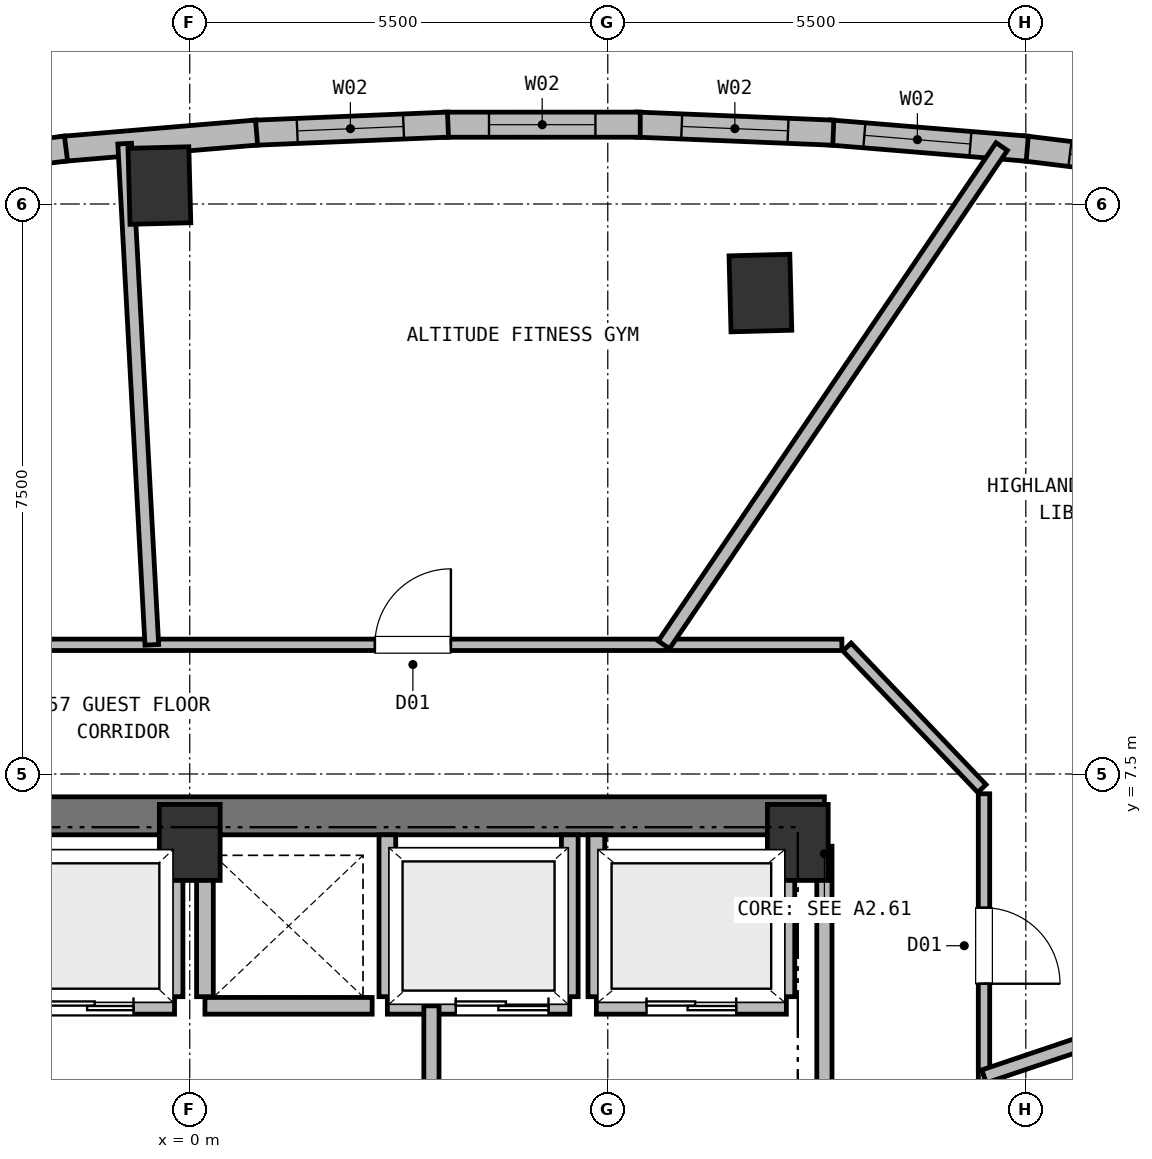
"""IFC4 building model, lengths in metres.
Left out: names, types, materials, properties, quantities, classifications, styles, units other than length and angle.
Written with IfcOpenShell. Run it as: python <this file> out.ifc"""

import sys

from ifc_helpers import new_model, si_unit, direction, frame, frame_2d, origin, origin_2d, place, context, subcontext, project, spatial, rectangle, extrude, element, fill, save


model = new_model("IFC4")
c1 = context("Model", 3, precision=1e-05, world=origin(), true_north=direction((0.0, 1.0)))
c2 = subcontext(c1, "Body", "Model", "MODEL_VIEW")
j1 = project(units=[si_unit("LENGTHUNIT", "METRE"), si_unit("PLANEANGLEUNIT", "RADIAN")], contexts=[c1])
p1 = place(None, origin())
s1 = spatial("IfcSite", under=j1, at=p1, CompositionType="ELEMENT")
p2 = place(p1, origin())
s2 = spatial("IfcBuilding", under=s1, at=p2, CompositionType="ELEMENT")
p3 = place(p2, frame((0.0, 0.0, 228.35)))
s3 = spatial("IfcBuildingStorey", under=s2, at=p3, CompositionType="ELEMENT", Elevation=228.35)
for number, where, z_axis, x_axis in (
    (1, (8.0, 6.6, 0.0), (0.0, 0.0, 1.0), (1.0, 0.0, 0.0)),
    (2, (0.0, 6.6, 0.0), (0.0, 0.0, 1.0), (1.0, 0.0, 0.0)),
):
    element("IfcColumn", number, at=place(p3, frame(where, z_axis=z_axis, x_axis=x_axis)), inside=s3, PredefinedType="COLUMN", context=c2, shape_type="SweptSolid", body=[
        extrude(rectangle(XDim=0.8, YDim=1.0, at=origin_2d()), origin(), (0.0, 0.0, 1.0), 3.8),
    ])
p4 = place(p3, frame((-8.35, 6.95, 0.0), z_axis=(0.0, 0.0, 1.0), x_axis=(1.0, 0.0, 0.0)))
e3 = element("IfcWall", 3, at=p4, inside=s3, PredefinedType="SHEAR", context=c2, shape_type="SweptSolid", body=[
    extrude(rectangle(XDim=16.7, YDim=0.5, at=frame_2d((8.35, 0.0))), origin(), (0.0, 0.0, 1.0), 3.55),
])
for number, where, z_axis, x_axis in (
    (4, (7.508, 13.828, 0.0), (0.0, 0.0, 1.0), (1.0, 0.026, 0.0)),
    (5, (-0.399, 15.243, 0.0), (0.0, 0.0, 1.0), (1.0, 0.026, 0.0)),
):
    element("IfcColumn", number, at=place(p3, frame(where, z_axis=z_axis, x_axis=x_axis)), inside=s3, PredefinedType="COLUMN", context=c2, shape_type="SweptSolid", body=[
        extrude(rectangle(XDim=0.8, YDim=1.0, at=origin_2d()), origin(), (0.0, 0.0, 1.0), 3.8),
    ])
p5 = place(p3, frame((10.969, 15.733, 0.0), z_axis=(0.0, 0.0, 1.0), x_axis=(0.99256490285, -0.121716529819, 0.0)))
e6 = element("IfcWall", 6, at=p5, inside=s3, PredefinedType="SOLIDWALL", context=c2, shape_type="SweptSolid", body=[
    extrude(rectangle(XDim=2.632, YDim=0.33, at=frame_2d((1.316, 0.0))), origin(), (0.0, 0.0, 1.0), 3.55),
])
p6 = place(p5, frame((0.616, 0.0, 0.72)))
e7 = element("IfcOpeningElement", 7, at=p6, cuts=e6, PredefinedType="OPENING", context=c2, shape_type="SweptSolid", body=[
    extrude(rectangle(XDim=1.4, YDim=1.84, at=frame_2d((0.7, 0.92))), frame((0.0, 0.175, 0.0), z_axis=(0.0, -1.0, 0.0), x_axis=(1.0, 0.0, 0.0)), (0.0, 0.0, 1.0), 0.35),
])
p7 = place(p3, frame((8.417, 15.941, 0.0), z_axis=(0.0, 0.0, 1.0), x_axis=(0.996652650266, -0.081752643485, 0.0)))
e8 = element("IfcWall", 8, at=p7, inside=s3, PredefinedType="SOLIDWALL", context=c2, shape_type="SweptSolid", body=[
    extrude(rectangle(XDim=2.61, YDim=0.33, at=frame_2d((1.305, 0.0))), origin(), (0.0, 0.0, 1.0), 3.55),
])
p8 = place(p7, frame((0.46, 0.0, 0.72)))
e9 = element("IfcOpeningElement", 9, at=p8, cuts=e8, PredefinedType="OPENING", context=c2, shape_type="SweptSolid", body=[
    extrude(rectangle(XDim=1.4, YDim=1.84, at=frame_2d((0.7, 0.92))), frame((0.0, 0.175, 0.0), z_axis=(0.0, -1.0, 0.0), x_axis=(1.0, 0.0, 0.0)), (0.0, 0.0, 1.0), 0.35),
])
p9 = place(p3, frame((5.877, 16.045, 0.0), z_axis=(0.0, 0.0, 1.0), x_axis=(0.999156737848, -0.041058655768, 0.0)))
e10 = element("IfcWall", 10, at=p9, inside=s3, PredefinedType="SOLIDWALL", context=c2, shape_type="SweptSolid", body=[
    extrude(rectangle(XDim=2.593, YDim=0.33, at=frame_2d((1.296, 0.0))), origin(), (0.0, 0.0, 1.0), 3.55),
])
p10 = place(p9, frame((0.596, 0.0, 0.72)))
e11 = element("IfcOpeningElement", 11, at=p10, cuts=e10, PredefinedType="OPENING", context=c2, shape_type="SweptSolid", body=[
    extrude(rectangle(XDim=1.4, YDim=1.84, at=frame_2d((0.7, 0.92))), frame((0.0, 0.175, 0.0), z_axis=(0.0, -1.0, 0.0), x_axis=(1.0, 0.0, 0.0)), (0.0, 0.0, 1.0), 0.35),
])
p11 = place(p3, frame((3.348, 16.043, 0.0), z_axis=(0.0, 0.0, 1.0), x_axis=(0.999999982082, 0.000189304303, 0.0)))
e12 = element("IfcWall", 12, at=p11, inside=s3, PredefinedType="SOLIDWALL", context=c2, shape_type="SweptSolid", body=[
    extrude(rectangle(XDim=2.579, YDim=0.33, at=frame_2d((1.29, 0.0))), origin(), (0.0, 0.0, 1.0), 3.55),
])
p12 = place(p11, frame((0.59, 0.0, 0.72)))
e13 = element("IfcOpeningElement", 13, at=p12, cuts=e12, PredefinedType="OPENING", context=c2, shape_type="SweptSolid", body=[
    extrude(rectangle(XDim=1.4, YDim=1.84, at=frame_2d((0.7, 0.92))), frame((0.0, 0.175, 0.0), z_axis=(0.0, -1.0, 0.0), x_axis=(1.0, 0.0, 0.0)), (0.0, 0.0, 1.0), 0.35),
])
p13 = place(p3, frame((0.829, 15.937, 0.0), z_axis=(0.0, 0.0, 1.0), x_axis=(0.999126476611, 0.041788559858, 0.0)))
e14 = element("IfcWall", 14, at=p13, inside=s3, PredefinedType="SOLIDWALL", context=c2, shape_type="SweptSolid", body=[
    extrude(rectangle(XDim=2.571, YDim=0.33, at=frame_2d((1.285, 0.0))), origin(), (0.0, 0.0, 1.0), 3.55),
])
p14 = place(p13, frame((0.585, 0.0, 0.72)))
e15 = element("IfcOpeningElement", 15, at=p14, cuts=e14, PredefinedType="OPENING", context=c2, shape_type="SweptSolid", body=[
    extrude(rectangle(XDim=1.4, YDim=1.84, at=frame_2d((0.7, 0.92))), frame((0.0, 0.175, 0.0), z_axis=(0.0, -1.0, 0.0), x_axis=(1.0, 0.0, 0.0)), (0.0, 0.0, 1.0), 0.35),
])
p15 = place(p3, frame((-1.678, 15.725, 0.0), z_axis=(0.0, 0.0, 1.0), x_axis=(0.996489100747, 0.083722590095, 0.0)))
e16 = element("IfcWall", 16, at=p15, inside=s3, PredefinedType="SOLIDWALL", context=c2, shape_type="SweptSolid", body=[
    extrude(rectangle(XDim=2.566, YDim=0.33, at=frame_2d((1.283, 0.0))), origin(), (0.0, 0.0, 1.0), 3.55),
])
p16 = place(p3, frame((-4.174, 15.409, 0.0), z_axis=(0.0, 0.0, 1.0), x_axis=(0.992107160936, 0.125392907376, 0.0)))
e17 = element("IfcWall", 17, at=p16, inside=s3, PredefinedType="SOLIDWALL", context=c2, shape_type="SweptSolid", body=[
    extrude(rectangle(XDim=2.566, YDim=0.33, at=frame_2d((1.283, 0.0))), origin(), (0.0, 0.0, 1.0), 3.55),
])
p17 = place(p16, frame((0.583, 0.0, 0.72)))
e18 = element("IfcOpeningElement", 18, at=p17, cuts=e17, PredefinedType="OPENING", context=c2, shape_type="SweptSolid", body=[
    extrude(rectangle(XDim=1.4, YDim=1.84, at=frame_2d((0.7, 0.92))), frame((0.0, 0.175, 0.0), z_axis=(0.0, -1.0, 0.0), x_axis=(1.0, 0.0, 0.0)), (0.0, 0.0, 1.0), 0.35),
])
p18 = place(p3, frame((5.35, 4.45, 0.0), z_axis=(0.0, 0.0, 1.0), x_axis=(1.0, 0.0, 0.0)))
e19 = element("IfcWall", 19, at=p18, inside=s3, PredefinedType="PARTITIONING", context=c2, shape_type="SweptSolid", body=[
    extrude(rectangle(XDim=2.5, YDim=0.22, at=frame_2d((1.25, 0.0))), origin(), (0.0, 0.0, 1.0), 3.55),
])
p19 = place(p18, frame((0.66, 0.0, 0.0)))
e20 = element("IfcOpeningElement", 20, at=p19, cuts=e19, PredefinedType="OPENING", context=c2, shape_type="SweptSolid", body=[
    extrude(rectangle(XDim=1.18, YDim=2.15, at=frame_2d((0.59, 1.075))), frame((0.0, 0.12, 0.0), z_axis=(0.0, -1.0, 0.0), x_axis=(1.0, 0.0, 0.0)), (0.0, 0.0, 1.0), 0.24),
])
p20 = place(p3, frame((5.35, 4.57, 0.0), z_axis=(0.0, 0.0, 1.0), x_axis=(0.0, 1.0, 0.0)))
e21 = element("IfcWall", 21, at=p20, inside=s3, PredefinedType="PARTITIONING", context=c2, shape_type="SweptSolid", body=[
    extrude(rectangle(XDim=2.13, YDim=0.22, at=frame_2d((1.065, 0.0))), origin(), (0.0, 0.0, 1.0), 3.55),
])
p21 = place(p3, frame((7.85, 4.57, 0.0), z_axis=(0.0, 0.0, 1.0), x_axis=(0.0, 1.0, 0.0)))
e22 = element("IfcWall", 22, at=p21, inside=s3, PredefinedType="PARTITIONING", context=c2, shape_type="SweptSolid", body=[
    extrude(rectangle(XDim=2.13, YDim=0.22, at=frame_2d((1.065, 0.0))), origin(), (0.0, 0.0, 1.0), 3.18),
])
p22 = place(p3, frame((2.6, 4.45, 0.0), z_axis=(0.0, 0.0, 1.0), x_axis=(1.0, 0.0, 0.0)))
e23 = element("IfcWall", 23, at=p22, inside=s3, PredefinedType="PARTITIONING", context=c2, shape_type="SweptSolid", body=[
    extrude(rectangle(XDim=2.4, YDim=0.22, at=frame_2d((1.2, 0.0))), origin(), (0.0, 0.0, 1.0), 3.55),
])
p23 = place(p22, frame((0.9, 0.0, 0.0)))
e24 = element("IfcOpeningElement", 24, at=p23, cuts=e23, PredefinedType="OPENING", context=c2, shape_type="SweptSolid", body=[
    extrude(rectangle(XDim=1.22, YDim=2.15, at=frame_2d((0.61, 1.075))), frame((0.0, 0.12, 0.0), z_axis=(0.0, -1.0, 0.0), x_axis=(1.0, 0.0, 0.0)), (0.0, 0.0, 1.0), 0.24),
])
for number, where, z_axis, x_axis in (
    (25, (2.6, 4.57, 0.0), (0.0, 0.0, 1.0), (0.0, 1.0, 0.0)),
    (26, (5.0, 4.57, 0.0), (0.0, 0.0, 1.0), (0.0, 1.0, 0.0)),
):
    element("IfcWall", number, at=place(p3, frame(where, z_axis=z_axis, x_axis=x_axis)), inside=s3, PredefinedType="PARTITIONING", context=c2, shape_type="SweptSolid", body=[
        extrude(rectangle(XDim=2.13, YDim=0.22, at=frame_2d((1.065, 0.0))), origin(), (0.0, 0.0, 1.0), 3.55),
    ])
p24 = place(p3, frame((-2.4, 4.45, 0.0), z_axis=(0.0, 0.0, 1.0), x_axis=(1.0, 0.0, 0.0)))
e27 = element("IfcWall", 27, at=p24, inside=s3, PredefinedType="PARTITIONING", context=c2, shape_type="SweptSolid", body=[
    extrude(rectangle(XDim=2.2, YDim=0.22, at=frame_2d((1.1, 0.0))), origin(), (0.0, 0.0, 1.0), 3.55),
])
p25 = place(p24, frame((0.54, 0.0, 0.0)))
e28 = element("IfcOpeningElement", 28, at=p25, cuts=e27, PredefinedType="OPENING", context=c2, shape_type="SweptSolid", body=[
    extrude(rectangle(XDim=1.12, YDim=2.15, at=frame_2d((0.56, 1.075))), frame((0.0, 0.12, 0.0), z_axis=(0.0, -1.0, 0.0), x_axis=(1.0, 0.0, 0.0)), (0.0, 0.0, 1.0), 0.24),
])
p26 = place(p3, frame((-0.2, 4.57, 0.0), z_axis=(0.0, 0.0, 1.0), x_axis=(0.0, 1.0, 0.0)))
e29 = element("IfcWall", 29, at=p26, inside=s3, PredefinedType="PARTITIONING", context=c2, shape_type="SweptSolid", body=[
    extrude(rectangle(XDim=2.13, YDim=0.22, at=frame_2d((1.065, 0.0))), origin(), (0.0, 0.0, 1.0), 3.55),
])
p27 = place(p3, frame((0.2, 4.45, 0.0), z_axis=(0.0, 0.0, 1.0), x_axis=(1.0, 0.0, 0.0)))
e30 = element("IfcWall", 30, at=p27, inside=s3, PredefinedType="PARTITIONING", context=c2, shape_type="SweptSolid", body=[
    extrude(rectangle(XDim=2.2, YDim=0.22, at=frame_2d((1.1, 0.0))), origin(), (0.0, 0.0, 1.0), 3.55),
])
p28 = place(p3, frame((0.2, 4.57, 0.0), z_axis=(0.0, 0.0, 1.0), x_axis=(0.0, 1.0, 0.0)))
e31 = element("IfcWall", 31, at=p28, inside=s3, PredefinedType="PARTITIONING", context=c2, shape_type="SweptSolid", body=[
    extrude(rectangle(XDim=2.13, YDim=0.22, at=frame_2d((1.065, 0.0))), origin(), (0.0, 0.0, 1.0), 3.55),
])
p29 = place(p3, frame((3.18, 1.15, 0.0), z_axis=(0.0, 0.0, 1.0), x_axis=(0.0, 1.0, 0.0)))
e32 = element("IfcWall", 32, at=p29, inside=s3, PredefinedType="PARTITIONING", context=c2, shape_type="SweptSolid", body=[
    extrude(rectangle(XDim=3.3, YDim=0.2, at=frame_2d((1.65, 0.0))), origin(), (0.0, 0.0, 1.0), 3.55),
])
p30 = place(p29, frame((1.08, 0.0, 0.0)))
e33 = element("IfcOpeningElement", 33, at=p30, cuts=e32, PredefinedType="OPENING", context=c2, shape_type="SweptSolid", body=[
    extrude(rectangle(XDim=1.15, YDim=2.15, at=frame_2d((0.575, 1.075))), frame((0.0, 0.11, 0.0), z_axis=(0.0, -1.0, 0.0), x_axis=(1.0, 0.0, 0.0)), (0.0, 0.0, 1.0), 0.22),
])
p31 = place(p3, frame((8.35, 1.25, 0.0), z_axis=(0.0, 0.0, 1.0), x_axis=(0.0, 1.0, 0.0)))
e34 = element("IfcWall", 34, at=p31, inside=s3, PredefinedType="PARTITIONING", context=c2, shape_type="SweptSolid", body=[
    extrude(rectangle(XDim=5.3, YDim=0.2, at=frame_2d((2.65, 0.0))), origin(), (0.0, 0.0, 1.0), 3.55),
])
p32 = place(p31, frame((0.95, 0.0, 0.0)))
e35 = element("IfcOpeningElement", 35, at=p32, cuts=e34, PredefinedType="OPENING", context=c2, shape_type="SweptSolid", body=[
    extrude(rectangle(XDim=1.15, YDim=2.15, at=frame_2d((0.575, 1.075))), frame((0.0, 0.11, 0.0), z_axis=(0.0, -1.0, 0.0), x_axis=(1.0, 0.0, 0.0)), (0.0, 0.0, 1.0), 0.22),
])
p33 = place(p3, frame((10.45, 7.24, 0.0), z_axis=(0.0, 0.0, 1.0), x_axis=(0.0, -1.0, 0.0)))
e36 = element("IfcWall", 36, at=p33, inside=s3, PredefinedType="PARTITIONING", context=c2, shape_type="SweptSolid", body=[
    extrude(rectangle(XDim=14.48, YDim=0.15, at=frame_2d((7.24, 0.0))), origin(), (0.0, 0.0, 1.0), 3.55),
])
p34 = place(p33, frame((5.499, 0.0, 0.0)))
e37 = element("IfcOpeningElement", 37, at=p34, cuts=e36, PredefinedType="OPENING", context=c2, shape_type="SweptSolid", body=[
    extrude(rectangle(XDim=1.06, YDim=2.15, at=frame_2d((0.53, 1.075))), frame((0.0, 0.085, 0.0), z_axis=(0.0, -1.0, 0.0), x_axis=(1.0, 0.0, 0.0)), (0.0, 0.0, 1.0), 0.17),
])
p35 = place(p33, frame((1.5, 0.0, 0.0)))
e38 = element("IfcOpeningElement", 38, at=p35, cuts=e36, PredefinedType="OPENING", context=c2, shape_type="SweptSolid", body=[
    extrude(rectangle(XDim=1.0, YDim=2.15, at=frame_2d((0.5, 1.075))), frame((0.0, 0.085, 0.0), z_axis=(0.0, -1.0, 0.0), x_axis=(1.0, 0.0, 0.0)), (0.0, 0.0, 1.0), 0.17),
])
p36 = place(p3, frame((8.648, 9.171, 0.0), z_axis=(0.0, 0.0, 1.0), x_axis=(0.689960858356, -0.723846678473, 0.0)))
e39 = element("IfcWall", 39, at=p36, inside=s3, PredefinedType="PARTITIONING", context=c2, shape_type="SweptSolid", body=[
    extrude(rectangle(XDim=2.572, YDim=0.15, at=frame_2d((1.286, 0.0))), origin(), (0.0, 0.0, 1.0), 3.55),
])
p37 = place(p3, frame((-8.58, 9.2, 0.0), z_axis=(0.0, 0.0, 1.0), x_axis=(1.0, 0.0, 0.0)))
e40 = element("IfcWall", 40, at=p37, inside=s3, PredefinedType="PARTITIONING", context=c2, shape_type="SweptSolid", body=[
    extrude(rectangle(XDim=17.16, YDim=0.15, at=frame_2d((8.58, 0.0))), origin(), (0.0, 0.0, 1.0), 3.55),
])
p38 = place(p37, frame((4.89, 0.0, 0.0)))
e41 = element("IfcOpeningElement", 41, at=p38, cuts=e40, PredefinedType="OPENING", context=c2, shape_type="SweptSolid", body=[
    extrude(rectangle(XDim=1.0, YDim=2.15, at=frame_2d((0.5, 1.075))), frame((0.0, 0.085, 0.0), z_axis=(0.0, -1.0, 0.0), x_axis=(1.0, 0.0, 0.0)), (0.0, 0.0, 1.0), 0.17),
])
p39 = place(p37, frame((11.016, 0.0, 0.0)))
e42 = element("IfcOpeningElement", 42, at=p39, cuts=e40, PredefinedType="OPENING", context=c2, shape_type="SweptSolid", body=[
    extrude(rectangle(XDim=1.0, YDim=2.15, at=frame_2d((0.5, 1.075))), frame((0.0, 0.085, 0.0), z_axis=(0.0, -1.0, 0.0), x_axis=(1.0, 0.0, 0.0)), (0.0, 0.0, 1.0), 0.17),
])
p40 = place(p3, frame((10.45, 3.521, 0.0), z_axis=(0.0, 0.0, 1.0), x_axis=(0.947649729023, 0.319311745919, 0.0)))
e43 = element("IfcWall", 43, at=p40, inside=s3, PredefinedType="PARTITIONING", context=c2, shape_type="SweptSolid", body=[
    extrude(rectangle(XDim=8.474, YDim=0.18, at=frame_2d((4.237, 0.0))), origin(), (0.0, 0.0, 1.0), 3.55),
])
p41 = place(p3, frame((6.238, 9.2, 0.0), z_axis=(0.0, 0.0, 1.0), x_axis=(0.561184790161, 0.827690540777, 0.0)))
e44 = element("IfcWall", 44, at=p41, inside=s3, PredefinedType="PARTITIONING", context=c2, shape_type="SweptSolid", body=[
    extrude(rectangle(XDim=7.92, YDim=0.18, at=frame_2d((3.96, 0.0))), origin(), (0.0, 0.0, 1.0), 3.55),
])
p42 = place(p3, frame((-0.499, 9.2, 0.0), z_axis=(0.0, 0.0, 1.0), x_axis=(-0.054120704993, 0.998534400655, 0.0)))
e45 = element("IfcWall", 45, at=p42, inside=s3, PredefinedType="PARTITIONING", context=c2, shape_type="SweptSolid", body=[
    extrude(rectangle(XDim=6.604, YDim=0.18, at=frame_2d((3.302, 0.0))), origin(), (0.0, 0.0, 1.0), 3.55),
])
p43 = place(p6, origin())
e46 = element("IfcWindow", 46, at=p43, inside=s3, PartitioningType="SINGLE_PANEL", PredefinedType="WINDOW", context=c2, shape_type="SweptSolid", body=[
    extrude(rectangle(XDim=1.4, YDim=1.84, at=frame_2d((0.7, 0.92))), frame((0.0, 0.03, 0.0), z_axis=(0.0, -1.0, 0.0), x_axis=(1.0, 0.0, 0.0)), (0.0, 0.0, 1.0), 0.06),
])
fill(e7, e46)
p44 = place(p8, origin())
e47 = element("IfcWindow", 47, at=p44, inside=s3, PartitioningType="SINGLE_PANEL", PredefinedType="WINDOW", context=c2, shape_type="SweptSolid", body=[
    extrude(rectangle(XDim=1.4, YDim=1.84, at=frame_2d((0.7, 0.92))), frame((0.0, 0.03, 0.0), z_axis=(0.0, -1.0, 0.0), x_axis=(1.0, 0.0, 0.0)), (0.0, 0.0, 1.0), 0.06),
])
fill(e9, e47)
p45 = place(p10, origin())
e48 = element("IfcWindow", 48, at=p45, inside=s3, PartitioningType="SINGLE_PANEL", PredefinedType="WINDOW", context=c2, shape_type="SweptSolid", body=[
    extrude(rectangle(XDim=1.4, YDim=1.84, at=frame_2d((0.7, 0.92))), frame((0.0, 0.03, 0.0), z_axis=(0.0, -1.0, 0.0), x_axis=(1.0, 0.0, 0.0)), (0.0, 0.0, 1.0), 0.06),
])
fill(e11, e48)
p46 = place(p12, origin())
e49 = element("IfcWindow", 49, at=p46, inside=s3, PartitioningType="SINGLE_PANEL", PredefinedType="WINDOW", context=c2, shape_type="SweptSolid", body=[
    extrude(rectangle(XDim=1.4, YDim=1.84, at=frame_2d((0.7, 0.92))), frame((0.0, 0.03, 0.0), z_axis=(0.0, -1.0, 0.0), x_axis=(1.0, 0.0, 0.0)), (0.0, 0.0, 1.0), 0.06),
])
fill(e13, e49)
p47 = place(p14, origin())
e50 = element("IfcWindow", 50, at=p47, inside=s3, PartitioningType="SINGLE_PANEL", PredefinedType="WINDOW", context=c2, shape_type="SweptSolid", body=[
    extrude(rectangle(XDim=1.4, YDim=1.84, at=frame_2d((0.7, 0.92))), frame((0.0, 0.03, 0.0), z_axis=(0.0, -1.0, 0.0), x_axis=(1.0, 0.0, 0.0)), (0.0, 0.0, 1.0), 0.06),
])
fill(e15, e50)
p48 = place(p19, origin())
e51 = element("IfcDoor", 51, at=p48, inside=s3, OperationType="DOUBLE_DOOR_SLIDING", PredefinedType="DOOR", context=c2, shape_type="SweptSolid", body=[
    extrude(rectangle(XDim=1.18, YDim=2.15, at=frame_2d((0.59, 1.075))), frame((0.0, 0.025, 0.0), z_axis=(0.0, -1.0, 0.0), x_axis=(1.0, 0.0, 0.0)), (0.0, 0.0, 1.0), 0.05),
])
fill(e20, e51)
p49 = place(p23, origin())
e52 = element("IfcDoor", 52, at=p49, inside=s3, OperationType="DOUBLE_DOOR_SLIDING", PredefinedType="DOOR", context=c2, shape_type="SweptSolid", body=[
    extrude(rectangle(XDim=1.22, YDim=2.15, at=frame_2d((0.61, 1.075))), frame((0.0, 0.025, 0.0), z_axis=(0.0, -1.0, 0.0), x_axis=(1.0, 0.0, 0.0)), (0.0, 0.0, 1.0), 0.05),
])
fill(e24, e52)
p50 = place(p25, origin())
e53 = element("IfcDoor", 53, at=p50, inside=s3, OperationType="DOUBLE_DOOR_SLIDING", PredefinedType="DOOR", context=c2, shape_type="SweptSolid", body=[
    extrude(rectangle(XDim=1.12, YDim=2.15, at=frame_2d((0.56, 1.075))), frame((0.0, 0.025, 0.0), z_axis=(0.0, -1.0, 0.0), x_axis=(1.0, 0.0, 0.0)), (0.0, 0.0, 1.0), 0.05),
])
fill(e28, e53)
p51 = place(p39, origin())
e54 = element("IfcDoor", 54, at=p51, inside=s3, OperationType="SINGLE_SWING_RIGHT", PredefinedType="DOOR", context=c2, shape_type="SweptSolid", body=[
    extrude(rectangle(XDim=1.0, YDim=2.15, at=frame_2d((0.5, 1.075))), frame((0.0, 0.025, 0.0), z_axis=(0.0, -1.0, 0.0), x_axis=(1.0, 0.0, 0.0)), (0.0, 0.0, 1.0), 0.05),
])
fill(e42, e54)
p52 = place(p35, origin())
e55 = element("IfcDoor", 55, at=p52, inside=s3, OperationType="SINGLE_SWING_RIGHT", PredefinedType="DOOR", context=c2, shape_type="SweptSolid", body=[
    extrude(rectangle(XDim=1.0, YDim=2.15, at=frame_2d((0.5, 1.075))), frame((0.0, 0.025, 0.0), z_axis=(0.0, -1.0, 0.0), x_axis=(1.0, 0.0, 0.0)), (0.0, 0.0, 1.0), 0.05),
])
fill(e38, e55)
save(model, sys.argv[1])
